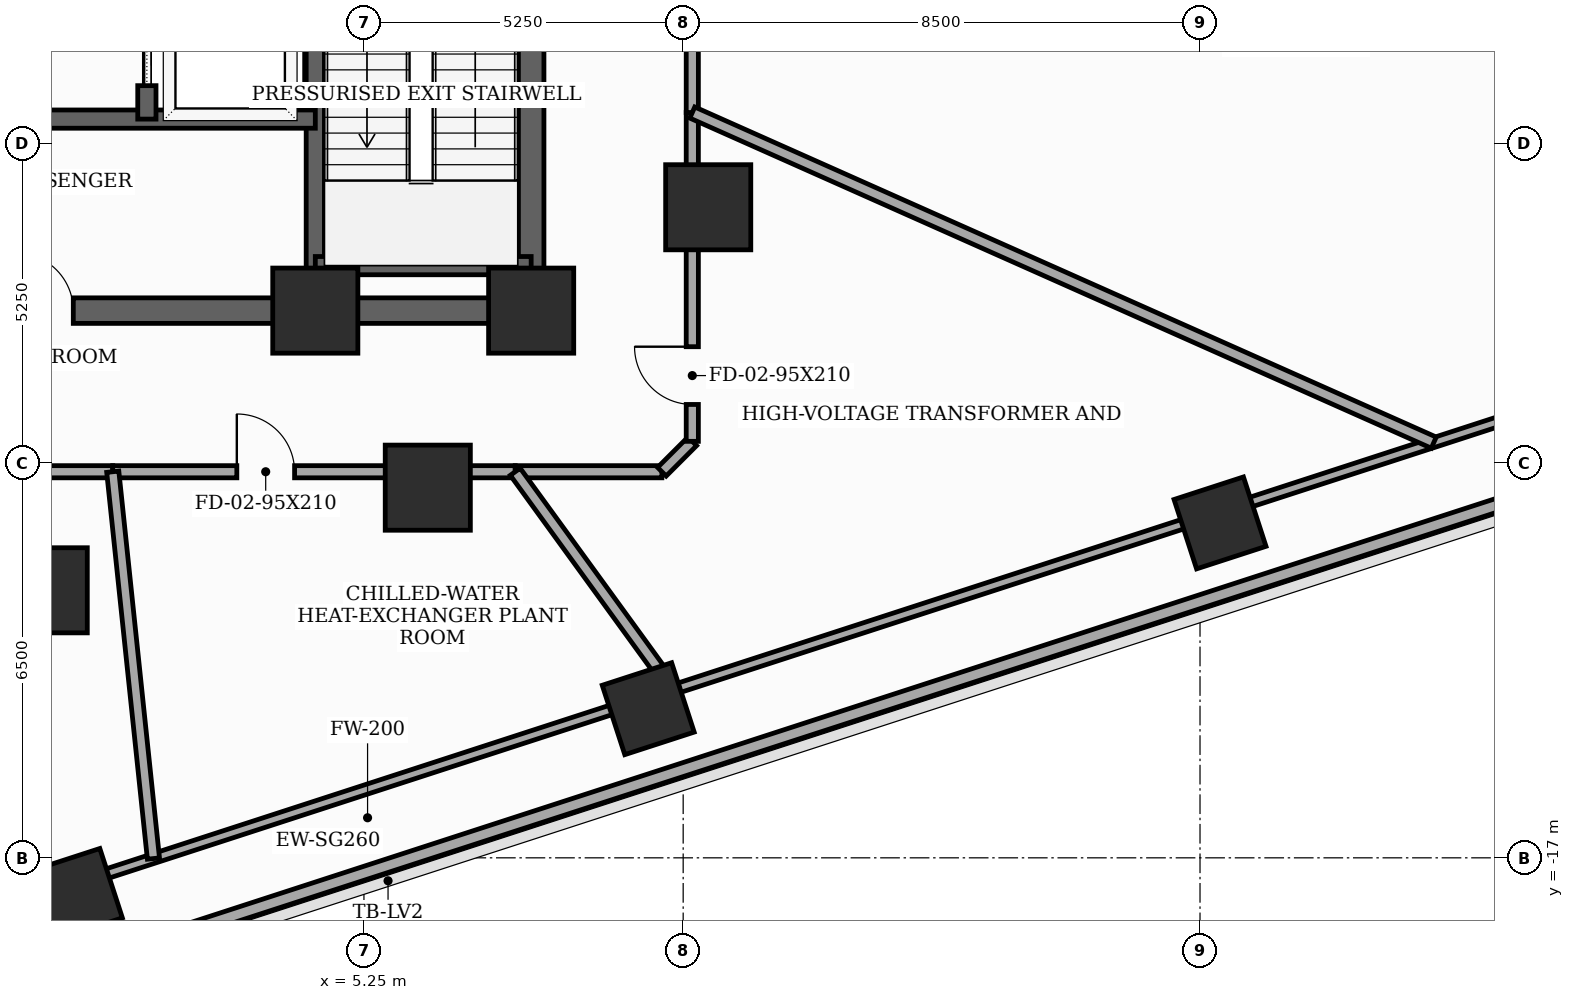
"""IFC4 building model, lengths in metres.
Left out: names, types, materials, properties, quantities, classifications, styles, units other than length and angle.
Written with IfcOpenShell. Run it as: python <this file> out.ifc"""

import sys

from ifc_helpers import new_model, si_unit, direction, frame, frame_2d, origin, origin_2d, place, context, subcontext, project, spatial, rectangle, extrude, element, fill, save


model = new_model("IFC4")
c1 = context("Model", 3, precision=1e-05, world=origin(), true_north=direction((0.0, 1.0)))
c2 = subcontext(c1, "Body", "Model", "MODEL_VIEW")
j1 = project(units=[si_unit("LENGTHUNIT", "METRE"), si_unit("PLANEANGLEUNIT", "RADIAN")], contexts=[c1])
p1 = place(None, origin())
s1 = spatial("IfcSite", under=j1, at=p1, CompositionType="ELEMENT")
p2 = place(p1, origin())
s2 = spatial("IfcBuilding", under=s1, at=p2, CompositionType="ELEMENT")
p3 = place(p2, frame((0.0, 0.0, 85.2)))
s3 = spatial("IfcBuildingStorey", under=s2, at=p3, CompositionType="ELEMENT", Elevation=85.2)
for number, where, z_axis, x_axis in (
    (1, (4.45, -8.0, 0.0), (0.0, 0.0, 1.0), (1.0, 0.0, 0.0)),
    (2, (8.0, -8.0, 0.0), (0.0, 0.0, 1.0), (1.0, 0.0, 0.0)),
    (3, (0.0, -12.6, 0.0), (0.0, 0.0, 1.0), (1.0, 0.0, 0.0)),
    (4, (6.3, -10.912, 0.0), (0.0, 0.0, 1.0), (1.0, 0.0, 0.0)),
    (5, (10.912, -6.3, 0.0), (0.0, 0.0, 1.0), (1.0, 0.0, 0.0)),
):
    element("IfcColumn", number, at=place(p3, frame(where, z_axis=z_axis, x_axis=x_axis)), inside=s3, PredefinedType="COLUMN", context=c2, shape_type="SweptSolid", body=[
        extrude(rectangle(XDim=1.4, YDim=1.4, at=origin_2d()), origin(), (0.0, 0.0, 1.0), 5.1),
    ])
for number, where, z_axis, x_axis in (
    (6, (0.521, -17.603, 0.0), (0.0, 0.0, 1.0), (0.951, 0.309, 0.0)),
    (7, (9.925, -14.547, 0.0), (0.0, 0.0, 1.0), (0.951, 0.309, 0.0)),
    (8, (19.329, -11.491, 0.0), (0.0, 0.0, 1.0), (0.951, 0.309, 0.0)),
):
    element("IfcColumn", number, at=place(p3, frame(where, z_axis=z_axis, x_axis=x_axis)), inside=s3, PredefinedType="COLUMN", context=c2, shape_type="SweptSolid", body=[
        extrude(rectangle(XDim=1.2, YDim=1.2, at=origin_2d()), origin(), (0.0, 0.0, 1.0), 5.1),
    ])
p4 = place(p3, frame((-17.938, -24.788, 0.0), z_axis=(0.0, 0.0, 1.0), x_axis=(0.951057835347, 0.309012934721, 0.0)))
e9 = element("IfcWall", 9, at=p4, inside=s3, PredefinedType="SOLIDWALL", context=c2, shape_type="SweptSolid", body=[
    extrude(rectangle(XDim=49.44, YDim=0.22, at=frame_2d((24.72, 0.0))), origin(), (0.0, 0.0, 1.0), 4.4),
])
p5 = place(p3, frame((8.0, -8.0, 0.0), z_axis=(0.0, 0.0, 1.0), x_axis=(0.0, 1.0, 0.0)))
e10 = element("IfcWall", 10, at=p5, inside=s3, PredefinedType="SHEAR", context=c2, shape_type="SweptSolid", body=[
    extrude(rectangle(XDim=16.0, YDim=0.42, at=frame_2d((8.0, 0.0))), origin(), (0.0, 0.0, 1.0), 4.9),
])
p6 = place(p5, frame((9.6, 0.0, 0.0)))
e11 = element("IfcOpeningElement", 11, at=p6, cuts=e10, PredefinedType="OPENING", context=c2, shape_type="SweptSolid", body=[
    extrude(rectangle(XDim=1.05, YDim=2.15, at=frame_2d((0.525, 1.075))), frame((0.0, 0.22, 0.0), z_axis=(0.0, -1.0, 0.0), x_axis=(1.0, 0.0, 0.0)), (0.0, 0.0, 1.0), 0.44),
])
p7 = place(p5, frame((14.229, 0.0, 0.0)))
e12 = element("IfcOpeningElement", 12, at=p7, cuts=e10, PredefinedType="OPENING", context=c2, shape_type="SweptSolid", body=[
    extrude(rectangle(XDim=0.85, YDim=2.02, at=frame_2d((0.425, 1.01))), frame((0.0, 0.22, 0.0), z_axis=(0.0, -1.0, 0.0), x_axis=(1.0, 0.0, 0.0)), (0.0, 0.0, 1.0), 0.44),
])
p8 = place(p3, frame((-8.0, -8.0, 0.0), z_axis=(0.0, 0.0, 1.0), x_axis=(1.0, 0.0, 0.0)))
e13 = element("IfcWall", 13, at=p8, inside=s3, PredefinedType="SHEAR", context=c2, shape_type="SweptSolid", body=[
    extrude(rectangle(XDim=16.0, YDim=0.42, at=frame_2d((8.0, 0.0))), origin(), (0.0, 0.0, 1.0), 4.9),
])
p9 = place(p8, frame((7.52, 0.0, 0.0)))
e14 = element("IfcOpeningElement", 14, at=p9, cuts=e13, PredefinedType="OPENING", context=c2, shape_type="SweptSolid", body=[
    extrude(rectangle(XDim=0.95, YDim=2.1, at=frame_2d((0.475, 1.05))), frame((0.0, 0.22, 0.0), z_axis=(0.0, -1.0, 0.0), x_axis=(1.0, 0.0, 0.0)), (0.0, 0.0, 1.0), 0.44),
])
p10 = place(p3, frame((4.45, -7.79, 0.0), z_axis=(0.0, 0.0, 1.0), x_axis=(0.0, 1.0, 0.0)))
e15 = element("IfcWall", 15, at=p10, inside=s3, PredefinedType="SHEAR", context=c2, shape_type="SweptSolid", body=[
    extrude(rectangle(XDim=15.58, YDim=0.3, at=frame_2d((7.79, 0.0))), origin(), (0.0, 0.0, 1.0), 4.9),
])
p11 = place(p3, frame((4.45, -7.26, 0.0), z_axis=(0.0, 0.0, 1.0), x_axis=(1.0, 0.0, 0.0)))
e16 = element("IfcWall", 16, at=p11, inside=s3, PredefinedType="SHEAR", context=c2, shape_type="SweptSolid", body=[
    extrude(rectangle(XDim=3.55, YDim=0.3, at=frame_2d((1.775, 0.0))), origin(), (0.0, 0.0, 1.0), 4.9),
])
p12 = place(p3, frame((-4.45, -4.85, 0.0), z_axis=(0.0, 0.0, 1.0), x_axis=(1.0, 0.0, 0.0)))
e17 = element("IfcWall", 17, at=p12, inside=s3, PredefinedType="SHEAR", context=c2, shape_type="SweptSolid", body=[
    extrude(rectangle(XDim=8.9, YDim=0.3, at=frame_2d((4.45, 0.0))), origin(), (0.0, 0.0, 1.0), 4.9),
])
p13 = place(p3, frame((1.68, -4.85, 0.0), z_axis=(0.0, 0.0, 1.0), x_axis=(0.0, 1.0, 0.0)))
e18 = element("IfcWall", 18, at=p13, inside=s3, PredefinedType="SHEAR", context=c2, shape_type="SweptSolid", body=[
    extrude(rectangle(XDim=12.64, YDim=0.3, at=frame_2d((6.32, 0.0))), origin(), (0.0, 0.0, 1.0), 4.9),
])
p14 = place(p13, frame((0.55, 0.0, 0.0)))
e19 = element("IfcOpeningElement", 19, at=p14, cuts=e18, PredefinedType="OPENING", context=c2, shape_type="SweptSolid", body=[
    extrude(rectangle(XDim=1.1, YDim=2.1, at=frame_2d((0.55, 1.05))), frame((0.0, 0.16, 0.0), z_axis=(0.0, -1.0, 0.0), x_axis=(1.0, 0.0, 0.0)), (0.0, 0.0, 1.0), 0.32),
])
p15 = place(p13, frame((2.65, 0.0, 0.0)))
e20 = element("IfcOpeningElement", 20, at=p15, cuts=e18, PredefinedType="OPENING", context=c2, shape_type="SweptSolid", body=[
    extrude(rectangle(XDim=1.1, YDim=2.1, at=frame_2d((0.55, 1.05))), frame((0.0, 0.16, 0.0), z_axis=(0.0, -1.0, 0.0), x_axis=(1.0, 0.0, 0.0)), (0.0, 0.0, 1.0), 0.32),
])
p16 = place(p13, frame((4.75, 0.0, 0.0)))
e21 = element("IfcOpeningElement", 21, at=p16, cuts=e18, PredefinedType="OPENING", context=c2, shape_type="SweptSolid", body=[
    extrude(rectangle(XDim=1.1, YDim=2.1, at=frame_2d((0.55, 1.05))), frame((0.0, 0.16, 0.0), z_axis=(0.0, -1.0, 0.0), x_axis=(1.0, 0.0, 0.0)), (0.0, 0.0, 1.0), 0.32),
])
p17 = place(p13, frame((6.85, 0.0, 0.0)))
e22 = element("IfcOpeningElement", 22, at=p17, cuts=e18, PredefinedType="OPENING", context=c2, shape_type="SweptSolid", body=[
    extrude(rectangle(XDim=1.1, YDim=2.1, at=frame_2d((0.55, 1.05))), frame((0.0, 0.16, 0.0), z_axis=(0.0, -1.0, 0.0), x_axis=(1.0, 0.0, 0.0)), (0.0, 0.0, 1.0), 0.32),
])
p18 = place(p13, frame((8.95, 0.0, 0.0)))
e23 = element("IfcOpeningElement", 23, at=p18, cuts=e18, PredefinedType="OPENING", context=c2, shape_type="SweptSolid", body=[
    extrude(rectangle(XDim=1.1, YDim=2.1, at=frame_2d((0.55, 1.05))), frame((0.0, 0.16, 0.0), z_axis=(0.0, -1.0, 0.0), x_axis=(1.0, 0.0, 0.0)), (0.0, 0.0, 1.0), 0.32),
])
p19 = place(p13, frame((11.05, 0.0, 0.0)))
e24 = element("IfcOpeningElement", 24, at=p19, cuts=e18, PredefinedType="OPENING", context=c2, shape_type="SweptSolid", body=[
    extrude(rectangle(XDim=1.1, YDim=2.1, at=frame_2d((0.55, 1.05))), frame((0.0, 0.16, 0.0), z_axis=(0.0, -1.0, 0.0), x_axis=(1.0, 0.0, 0.0)), (0.0, 0.0, 1.0), 0.32),
])
p20 = place(p3, frame((-7.036, 28.85, 0.0), z_axis=(0.0, 0.0, 1.0), x_axis=(0.743144937383, -0.669130482075, 0.0)))
e25 = element("IfcWall", 25, at=p20, inside=s3, PredefinedType="SOLIDWALL", context=c2, shape_type="SweptSolid", body=[
    extrude(rectangle(XDim=49.066, YDim=0.16, at=frame_2d((24.533, 0.0))), origin(), (0.0, 0.0, 1.0), 3.485),
])
p21 = place(p3, frame((28.503, -8.332, 0.0), z_axis=(0.0, 0.0, 1.0), x_axis=(-0.951056261584, -0.309017778296, 0.0)))
e26 = element("IfcWall", 26, at=p21, inside=s3, PredefinedType="SOLIDWALL", context=c2, shape_type="SweptSolid", body=[
    extrude(rectangle(XDim=49.066, YDim=0.16, at=frame_2d((24.533, 0.0))), origin(), (0.0, 0.0, 1.0), 3.485),
])
p22 = place(p3, frame((-4.742, -10.65, 0.0), z_axis=(0.0, 0.0, 1.0), x_axis=(1.0, 0.0, 0.0)))
e27 = element("IfcWall", 27, at=p22, inside=s3, PredefinedType="SOLIDWALL", context=c2, shape_type="SweptSolid", body=[
    extrude(rectangle(XDim=5.861, YDim=0.2, at=frame_2d((2.93, 0.0))), origin(), (0.0, 0.0, 1.0), 4.285),
])
p23 = place(p22, frame((2.456, 0.0, 0.0)))
e28 = element("IfcOpeningElement", 28, at=p23, cuts=e27, PredefinedType="OPENING", context=c2, shape_type="SweptSolid", body=[
    extrude(rectangle(XDim=0.95, YDim=2.1, at=frame_2d((0.475, 1.05))), frame((0.0, 0.11, 0.0), z_axis=(0.0, -1.0, 0.0), x_axis=(1.0, 0.0, 0.0)), (0.0, 0.0, 1.0), 0.22),
])
p24 = place(p3, frame((1.119, -10.65, 0.0), z_axis=(0.0, 0.0, 1.0), x_axis=(1.0, 0.0, 0.0)))
e29 = element("IfcWall", 29, at=p24, inside=s3, PredefinedType="SOLIDWALL", context=c2, shape_type="SweptSolid", body=[
    extrude(rectangle(XDim=6.619, YDim=0.2, at=frame_2d((3.31, 0.0))), origin(), (0.0, 0.0, 1.0), 3.485),
])
p25 = place(p24, frame((2.04, 0.0, 0.0)))
e30 = element("IfcOpeningElement", 30, at=p25, cuts=e29, PredefinedType="OPENING", context=c2, shape_type="SweptSolid", body=[
    extrude(rectangle(XDim=0.95, YDim=2.1, at=frame_2d((0.475, 1.05))), frame((0.0, 0.11, 0.0), z_axis=(0.0, -1.0, 0.0), x_axis=(1.0, 0.0, 0.0)), (0.0, 0.0, 1.0), 0.22),
])
p26 = place(p3, frame((7.738, -10.65, 0.0), z_axis=(0.0, 0.0, 1.0), x_axis=(1.0, 0.0, 0.0)))
e31 = element("IfcWall", 31, at=p26, inside=s3, PredefinedType="SOLIDWALL", context=c2, shape_type="SweptSolid", body=[
    extrude(rectangle(XDim=2.412, YDim=0.2, at=frame_2d((1.206, 0.0))), origin(), (0.0, 0.0, 1.0), 4.9),
])
p27 = place(p3, frame((10.15, -10.65, 0.0), z_axis=(0.0, 0.0, 1.0), x_axis=(0.707106781187, 0.707106781187, 0.0)))
e32 = element("IfcWall", 32, at=p27, inside=s3, PredefinedType="SOLIDWALL", context=c2, shape_type="SweptSolid", body=[
    extrude(rectangle(XDim=0.707, YDim=0.2, at=frame_2d((0.354, 0.0))), origin(), (0.0, 0.0, 1.0), 4.9),
])
p28 = place(p3, frame((10.65, -10.15, 0.0), z_axis=(0.0, 0.0, 1.0), x_axis=(0.0, 1.0, 0.0)))
e33 = element("IfcWall", 33, at=p28, inside=s3, PredefinedType="SOLIDWALL", context=c2, shape_type="SweptSolid", body=[
    extrude(rectangle(XDim=5.408, YDim=0.2, at=frame_2d((2.704, 0.0))), origin(), (0.0, 0.0, 1.0), 3.485),
])
p29 = place(p28, frame((0.607, 0.0, 0.0)))
e34 = element("IfcOpeningElement", 34, at=p29, cuts=e33, PredefinedType="OPENING", context=c2, shape_type="SweptSolid", body=[
    extrude(rectangle(XDim=0.95, YDim=2.1, at=frame_2d((0.475, 1.05))), frame((0.0, 0.11, 0.0), z_axis=(0.0, -1.0, 0.0), x_axis=(1.0, 0.0, 0.0)), (0.0, 0.0, 1.0), 0.22),
])
p30 = place(p3, frame((10.65, -4.742, 0.0), z_axis=(0.0, 0.0, 1.0), x_axis=(0.0, 1.0, 0.0)))
e35 = element("IfcWall", 35, at=p30, inside=s3, PredefinedType="SOLIDWALL", context=c2, shape_type="SweptSolid", body=[
    extrude(rectangle(XDim=5.861, YDim=0.2, at=frame_2d((2.93, 0.0))), origin(), (0.0, 0.0, 1.0), 4.285),
])
p31 = place(p30, frame((2.456, 0.0, 0.0)))
e36 = element("IfcOpeningElement", 36, at=p31, cuts=e35, PredefinedType="OPENING", context=c2, shape_type="SweptSolid", body=[
    extrude(rectangle(XDim=0.95, YDim=2.1, at=frame_2d((0.475, 1.05))), frame((0.0, 0.11, 0.0), z_axis=(0.0, -1.0, 0.0), x_axis=(1.0, 0.0, 0.0)), (0.0, 0.0, 1.0), 0.22),
])
p32 = place(p3, frame((1.788, -17.012, 0.0), z_axis=(0.0, 0.0, 1.0), x_axis=(-0.104603336042, 0.994514023073, 0.0)))
e37 = element("IfcWall", 37, at=p32, inside=s3, PredefinedType="SOLIDWALL", context=c2, shape_type="SweptSolid", body=[
    extrude(rectangle(XDim=6.397, YDim=0.2, at=frame_2d((3.199, 0.0))), origin(), (0.0, 0.0, 1.0), 3.485),
])
p33 = place(p3, frame((10.341, -14.233, 0.0), z_axis=(0.0, 0.0, 1.0), x_axis=(-0.587732406508, 0.809055386448, 0.0)))
e38 = element("IfcWall", 38, at=p33, inside=s3, PredefinedType="SOLIDWALL", context=c2, shape_type="SweptSolid", body=[
    extrude(rectangle(XDim=4.429, YDim=0.2, at=frame_2d((2.214, 0.0))), origin(), (0.0, 0.0, 1.0), 3.485),
])
p34 = place(p3, frame((22.844, -10.171, 0.0), z_axis=(0.0, 0.0, 1.0), x_axis=(-0.913551146969, 0.406723864399, 0.0)))
e39 = element("IfcWall", 39, at=p34, inside=s3, PredefinedType="SOLIDWALL", context=c2, shape_type="SweptSolid", body=[
    extrude(rectangle(XDim=13.348, YDim=0.2, at=frame_2d((6.674, 0.0))), origin(), (0.0, 0.0, 1.0), 3.485),
])
p35 = place(p9, origin())
e40 = element("IfcDoor", 40, at=p35, inside=s3, OperationType="SINGLE_SWING_LEFT", PredefinedType="DOOR", context=c2, shape_type="SweptSolid", body=[
    extrude(rectangle(XDim=0.95, YDim=2.1, at=frame_2d((0.475, 1.05))), frame((0.0, 0.025, 0.0), z_axis=(0.0, -1.0, 0.0), x_axis=(1.0, 0.0, 0.0)), (0.0, 0.0, 1.0), 0.05),
])
fill(e14, e40)
p36 = place(p14, origin())
e41 = element("IfcDoor", 41, at=p36, inside=s3, OperationType="SLIDING_TO_LEFT", PredefinedType="DOOR", context=c2, shape_type="SweptSolid", body=[
    extrude(rectangle(XDim=1.1, YDim=2.1, at=frame_2d((0.55, 1.05))), frame((0.0, 0.025, 0.0), z_axis=(0.0, -1.0, 0.0), x_axis=(1.0, 0.0, 0.0)), (0.0, 0.0, 1.0), 0.05),
])
fill(e19, e41)
p37 = place(p25, origin())
e42 = element("IfcDoor", 42, at=p37, inside=s3, OperationType="SINGLE_SWING_LEFT", PredefinedType="DOOR", context=c2, shape_type="SweptSolid", body=[
    extrude(rectangle(XDim=0.95, YDim=2.1, at=frame_2d((0.475, 1.05))), frame((0.0, 0.025, 0.0), z_axis=(0.0, -1.0, 0.0), x_axis=(1.0, 0.0, 0.0)), (0.0, 0.0, 1.0), 0.05),
])
fill(e30, e42)
p38 = place(p29, origin())
e43 = element("IfcDoor", 43, at=p38, inside=s3, OperationType="SINGLE_SWING_RIGHT", PredefinedType="DOOR", context=c2, shape_type="SweptSolid", body=[
    extrude(rectangle(XDim=0.95, YDim=2.1, at=frame_2d((0.475, 1.05))), frame((0.0, 0.025, 0.0), z_axis=(0.0, -1.0, 0.0), x_axis=(1.0, 0.0, 0.0)), (0.0, 0.0, 1.0), 0.05),
])
fill(e34, e43)
save(model, sys.argv[1])
